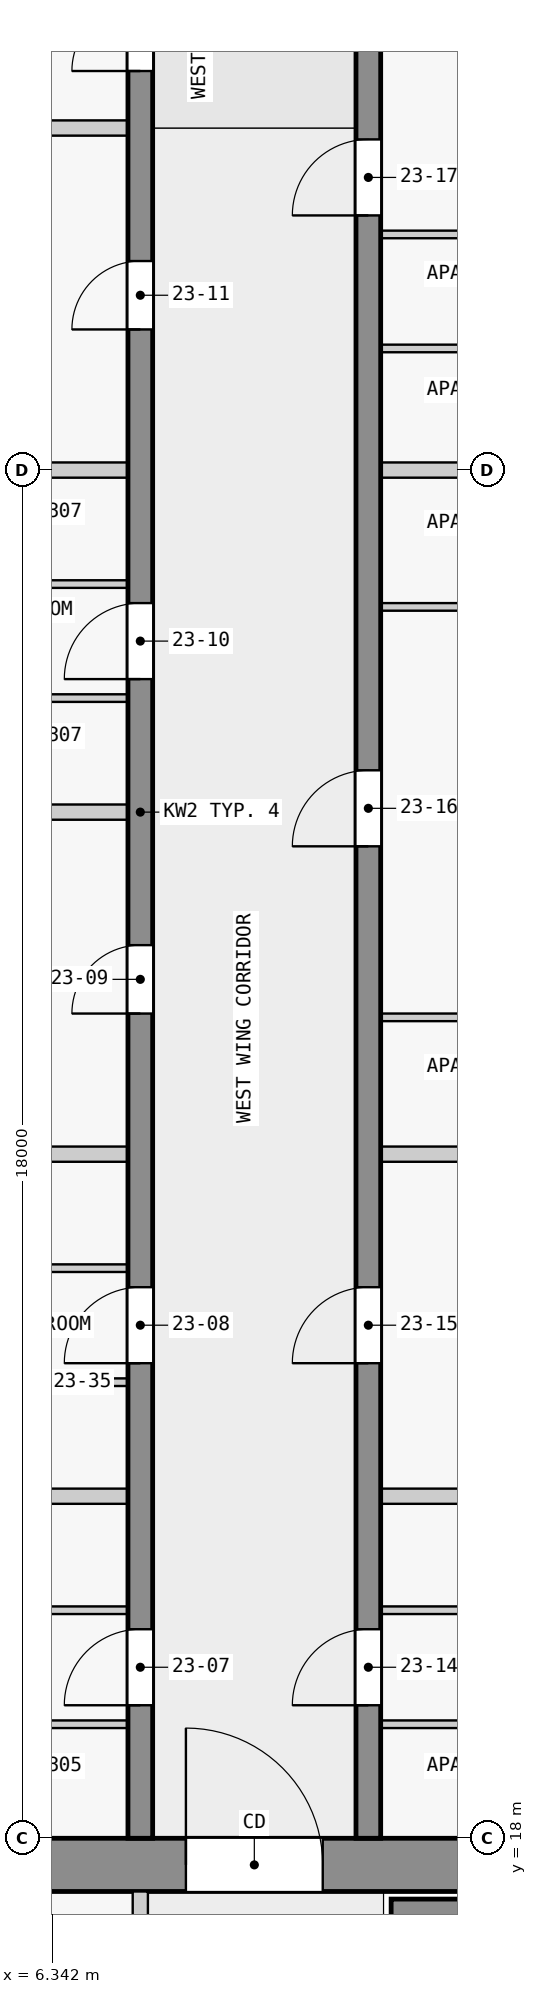
"""IFC4 building model, lengths in metres.
Left out: names, types, materials, properties, quantities, classifications, styles, units other than length and angle.
Written with IfcOpenShell. Run it as: python <this file> out.ifc"""

import sys

from ifc_helpers import new_model, si_unit, direction, frame, frame_2d, origin, place, context, subcontext, project, spatial, rectangle, extrude, element, fill, save


model = new_model("IFC4")
c1 = context("Model", 3, precision=1e-05, world=origin(), true_north=direction((0.0, 1.0)))
c2 = subcontext(c1, "Body", "Model", "MODEL_VIEW")
j1 = project(units=[si_unit("LENGTHUNIT", "METRE"), si_unit("PLANEANGLEUNIT", "RADIAN")], contexts=[c1])
p1 = place(None, origin())
s1 = spatial("IfcSite", under=j1, at=p1, CompositionType="ELEMENT")
p2 = place(p1, origin())
s2 = spatial("IfcBuilding", under=s1, at=p2, CompositionType="ELEMENT")
p3 = place(p2, frame((0.0, 0.0, 92.3)))
s3 = spatial("IfcBuildingStorey", under=s2, at=p3, CompositionType="ELEMENT", Elevation=92.3)
p4 = place(p3, frame((1.6, 17.65, 0.0), z_axis=(0.0, 0.0, 1.0), x_axis=(1.0, 0.0, 0.0)))
e1 = element("IfcWall", 1, at=p4, inside=s3, PredefinedType="SHEAR", context=c2, shape_type="SweptSolid", body=[
    extrude(rectangle(XDim=20.9, YDim=0.7, at=frame_2d((10.45, 0.0))), origin(), (0.0, 0.0, 1.0), 3.25),
])
p5 = place(p4, frame((6.5, 0.0, 0.0)))
e2 = element("IfcOpeningElement", 2, at=p5, cuts=e1, PredefinedType="OPENING", context=c2, shape_type="SweptSolid", body=[
    extrude(rectangle(XDim=1.8, YDim=2.1, at=frame_2d((0.9, 1.05))), frame((0.0, 0.36, 0.0), z_axis=(0.0, -1.0, 0.0), x_axis=(1.0, 0.0, 0.0)), (0.0, 0.0, 1.0), 0.72),
])
p6 = place(p3, frame((10.8, 17.05, 0.0), z_axis=(0.0, 0.0, 1.0), x_axis=(1.0, 0.0, 0.0)))
e3 = element("IfcWall", 3, at=p6, inside=s3, PredefinedType="SHEAR", context=c2, shape_type="SweptSolid", body=[
    extrude(rectangle(XDim=7.8, YDim=0.3, at=frame_2d((3.9, 0.0))), origin(), (0.0, 0.0, 1.0), 3.25),
])
p7 = place(p3, frame((7.5, 18.0, 0.0), z_axis=(0.0, 0.0, 1.0), x_axis=(0.0, 1.0, 0.0)))
e4 = element("IfcWall", 4, at=p7, inside=s3, PredefinedType="SHEAR", context=c2, shape_type="SweptSolid", body=[
    extrude(rectangle(XDim=27.0, YDim=0.325, at=frame_2d((13.5, 0.0))), origin(), (0.0, 0.0, 1.0), 3.25),
])
p8 = place(p7, frame((1.75, 0.0, 0.0)))
e5 = element("IfcOpeningElement", 5, at=p8, cuts=e4, PredefinedType="OPENING", context=c2, shape_type="SweptSolid", body=[
    extrude(rectangle(XDim=1.0, YDim=2.1, at=frame_2d((0.5, 1.05))), frame((0.0, 0.172, 0.0), z_axis=(0.0, -1.0, 0.0), x_axis=(1.0, 0.0, 0.0)), (0.0, 0.0, 1.0), 0.345),
])
p9 = place(p7, frame((6.25, 0.0, 0.0)))
e6 = element("IfcOpeningElement", 6, at=p9, cuts=e4, PredefinedType="OPENING", context=c2, shape_type="SweptSolid", body=[
    extrude(rectangle(XDim=1.0, YDim=2.1, at=frame_2d((0.5, 1.05))), frame((0.0, 0.172, 0.0), z_axis=(0.0, -1.0, 0.0), x_axis=(1.0, 0.0, 0.0)), (0.0, 0.0, 1.0), 0.345),
])
p10 = place(p7, frame((10.85, 0.0, 0.0)))
e7 = element("IfcOpeningElement", 7, at=p10, cuts=e4, PredefinedType="OPENING", context=c2, shape_type="SweptSolid", body=[
    extrude(rectangle(XDim=0.9, YDim=2.1, at=frame_2d((0.45, 1.05))), frame((0.0, 0.172, 0.0), z_axis=(0.0, -1.0, 0.0), x_axis=(1.0, 0.0, 0.0)), (0.0, 0.0, 1.0), 0.345),
])
p11 = place(p7, frame((15.25, 0.0, 0.0)))
e8 = element("IfcOpeningElement", 8, at=p11, cuts=e4, PredefinedType="OPENING", context=c2, shape_type="SweptSolid", body=[
    extrude(rectangle(XDim=1.0, YDim=2.1, at=frame_2d((0.5, 1.05))), frame((0.0, 0.172, 0.0), z_axis=(0.0, -1.0, 0.0), x_axis=(1.0, 0.0, 0.0)), (0.0, 0.0, 1.0), 0.345),
])
p12 = place(p7, frame((19.85, 0.0, 0.0)))
e9 = element("IfcOpeningElement", 9, at=p12, cuts=e4, PredefinedType="OPENING", context=c2, shape_type="SweptSolid", body=[
    extrude(rectangle(XDim=0.9, YDim=2.1, at=frame_2d((0.45, 1.05))), frame((0.0, 0.172, 0.0), z_axis=(0.0, -1.0, 0.0), x_axis=(1.0, 0.0, 0.0)), (0.0, 0.0, 1.0), 0.345),
])
p13 = place(p7, frame((23.25, 0.0, 0.0)))
e10 = element("IfcOpeningElement", 10, at=p13, cuts=e4, PredefinedType="OPENING", context=c2, shape_type="SweptSolid", body=[
    extrude(rectangle(XDim=0.9, YDim=2.1, at=frame_2d((0.45, 1.05))), frame((0.0, 0.172, 0.0), z_axis=(0.0, -1.0, 0.0), x_axis=(1.0, 0.0, 0.0)), (0.0, 0.0, 1.0), 0.345),
])
p14 = place(p7, frame((25.45, 0.0, 0.0)))
e11 = element("IfcOpeningElement", 11, at=p14, cuts=e4, PredefinedType="OPENING", context=c2, shape_type="SweptSolid", body=[
    extrude(rectangle(XDim=1.0, YDim=2.1, at=frame_2d((0.5, 1.05))), frame((0.0, 0.172, 0.0), z_axis=(0.0, -1.0, 0.0), x_axis=(1.0, 0.0, 0.0)), (0.0, 0.0, 1.0), 0.345),
])
p15 = place(p3, frame((10.5, 18.0, 0.0), z_axis=(0.0, 0.0, 1.0), x_axis=(0.0, 1.0, 0.0)))
e12 = element("IfcWall", 12, at=p15, inside=s3, PredefinedType="SHEAR", context=c2, shape_type="SweptSolid", body=[
    extrude(rectangle(XDim=27.0, YDim=0.325, at=frame_2d((13.5, 0.0))), origin(), (0.0, 0.0, 1.0), 3.25),
])
p16 = place(p15, frame((1.75, 0.0, 0.0)))
e13 = element("IfcOpeningElement", 13, at=p16, cuts=e12, PredefinedType="OPENING", context=c2, shape_type="SweptSolid", body=[
    extrude(rectangle(XDim=1.0, YDim=2.1, at=frame_2d((0.5, 1.05))), frame((0.0, 0.172, 0.0), z_axis=(0.0, -1.0, 0.0), x_axis=(1.0, 0.0, 0.0)), (0.0, 0.0, 1.0), 0.345),
])
p17 = place(p15, frame((6.25, 0.0, 0.0)))
e14 = element("IfcOpeningElement", 14, at=p17, cuts=e12, PredefinedType="OPENING", context=c2, shape_type="SweptSolid", body=[
    extrude(rectangle(XDim=1.0, YDim=2.1, at=frame_2d((0.5, 1.05))), frame((0.0, 0.172, 0.0), z_axis=(0.0, -1.0, 0.0), x_axis=(1.0, 0.0, 0.0)), (0.0, 0.0, 1.0), 0.345),
])
p18 = place(p15, frame((13.05, 0.0, 0.0)))
e15 = element("IfcOpeningElement", 15, at=p18, cuts=e12, PredefinedType="OPENING", context=c2, shape_type="SweptSolid", body=[
    extrude(rectangle(XDim=1.0, YDim=2.1, at=frame_2d((0.5, 1.05))), frame((0.0, 0.172, 0.0), z_axis=(0.0, -1.0, 0.0), x_axis=(1.0, 0.0, 0.0)), (0.0, 0.0, 1.0), 0.345),
])
p19 = place(p15, frame((21.35, 0.0, 0.0)))
e16 = element("IfcOpeningElement", 16, at=p19, cuts=e12, PredefinedType="OPENING", context=c2, shape_type="SweptSolid", body=[
    extrude(rectangle(XDim=1.0, YDim=2.1, at=frame_2d((0.5, 1.05))), frame((0.0, 0.172, 0.0), z_axis=(0.0, -1.0, 0.0), x_axis=(1.0, 0.0, 0.0)), (0.0, 0.0, 1.0), 0.345),
])
p20 = place(p3, frame((7.5, 10.1, 0.0), z_axis=(0.0, 0.0, 1.0), x_axis=(0.0, 1.0, 0.0)))
e17 = element("IfcWall", 17, at=p20, inside=s3, PredefinedType="PARTITIONING", context=c2, shape_type="SweptSolid", body=[
    extrude(rectangle(XDim=7.2, YDim=0.2, at=frame_2d((3.6, 0.0))), origin(), (0.0, 0.0, 1.0), 3.25),
])
p21 = place(p20, frame((1.05, 0.0, 0.0)))
e18 = element("IfcOpeningElement", 18, at=p21, cuts=e17, PredefinedType="OPENING", context=c2, shape_type="SweptSolid", body=[
    extrude(rectangle(XDim=0.9, YDim=2.1, at=frame_2d((0.45, 1.05))), frame((0.0, 0.11, 0.0), z_axis=(0.0, -1.0, 0.0), x_axis=(1.0, 0.0, 0.0)), (0.0, 0.0, 1.0), 0.22),
])
p22 = place(p20, frame((4.65, 0.0, 0.0)))
e19 = element("IfcOpeningElement", 19, at=p22, cuts=e17, PredefinedType="OPENING", context=c2, shape_type="SweptSolid", body=[
    extrude(rectangle(XDim=0.9, YDim=2.1, at=frame_2d((0.45, 1.05))), frame((0.0, 0.11, 0.0), z_axis=(0.0, -1.0, 0.0), x_axis=(1.0, 0.0, 0.0)), (0.0, 0.0, 1.0), 0.22),
])
p23 = place(p3, frame((7.337, 19.5, 0.0), z_axis=(0.0, 0.0, 1.0), x_axis=(-1.0, 0.0, 0.0)))
e20 = element("IfcWall", 20, at=p23, inside=s3, PredefinedType="PARTITIONING", context=c2, shape_type="SweptSolid", body=[
    extrude(rectangle(XDim=3.4, YDim=0.1, at=frame_2d((1.7, 0.0))), origin(), (0.0, 0.0, 1.0), 3.25),
])
p24 = place(p23, frame((1.25, 0.0, 0.0)))
e21 = element("IfcOpeningElement", 21, at=p24, cuts=e20, PredefinedType="OPENING", context=c2, shape_type="SweptSolid", body=[
    extrude(rectangle(XDim=0.9, YDim=2.1, at=frame_2d((0.45, 1.05))), frame((0.0, 0.06, 0.0), z_axis=(0.0, -1.0, 0.0), x_axis=(1.0, 0.0, 0.0)), (0.0, 0.0, 1.0), 0.12),
])
p25 = place(p3, frame((14.062, 19.5, 0.0), z_axis=(0.0, 0.0, 1.0), x_axis=(-1.0, 0.0, 0.0)))
e22 = element("IfcWall", 22, at=p25, inside=s3, PredefinedType="PARTITIONING", context=c2, shape_type="SweptSolid", body=[
    extrude(rectangle(XDim=3.4, YDim=0.1, at=frame_2d((1.7, 0.0))), origin(), (0.0, 0.0, 1.0), 3.25),
])
p26 = place(p25, frame((1.25, 0.0, 0.0)))
e23 = element("IfcOpeningElement", 23, at=p26, cuts=e22, PredefinedType="OPENING", context=c2, shape_type="SweptSolid", body=[
    extrude(rectangle(XDim=0.9, YDim=2.1, at=frame_2d((0.45, 1.05))), frame((0.0, 0.06, 0.0), z_axis=(0.0, -1.0, 0.0), x_axis=(1.0, 0.0, 0.0)), (0.0, 0.0, 1.0), 0.12),
])
p27 = place(p3, frame((3.938, 21.0, 0.0), z_axis=(0.0, 0.0, 1.0), x_axis=(1.0, 0.0, 0.0)))
e24 = element("IfcWall", 24, at=p27, inside=s3, PredefinedType="PARTITIONING", context=c2, shape_type="SweptSolid", body=[
    extrude(rectangle(XDim=3.4, YDim=0.1, at=frame_2d((1.7, 0.0))), origin(), (0.0, 0.0, 1.0), 3.25),
])
p28 = place(p27, frame((1.25, 0.0, 0.0)))
e25 = element("IfcOpeningElement", 25, at=p28, cuts=e24, PredefinedType="OPENING", context=c2, shape_type="SweptSolid", body=[
    extrude(rectangle(XDim=0.9, YDim=2.1, at=frame_2d((0.45, 1.05))), frame((0.0, 0.06, 0.0), z_axis=(0.0, -1.0, 0.0), x_axis=(1.0, 0.0, 0.0)), (0.0, 0.0, 1.0), 0.12),
])
p29 = place(p3, frame((10.663, 21.0, 0.0), z_axis=(0.0, 0.0, 1.0), x_axis=(1.0, 0.0, 0.0)))
e26 = element("IfcWall", 26, at=p29, inside=s3, PredefinedType="PARTITIONING", context=c2, shape_type="SweptSolid", body=[
    extrude(rectangle(XDim=3.4, YDim=0.1, at=frame_2d((1.7, 0.0))), origin(), (0.0, 0.0, 1.0), 3.25),
])
p30 = place(p29, frame((1.25, 0.0, 0.0)))
e27 = element("IfcOpeningElement", 27, at=p30, cuts=e26, PredefinedType="OPENING", context=c2, shape_type="SweptSolid", body=[
    extrude(rectangle(XDim=0.9, YDim=2.1, at=frame_2d((0.45, 1.05))), frame((0.0, 0.06, 0.0), z_axis=(0.0, -1.0, 0.0), x_axis=(1.0, 0.0, 0.0)), (0.0, 0.0, 1.0), 0.12),
])
for number, where, z_axis, x_axis in (
    (28, (7.337, 22.5, 0.0), (0.0, 0.0, 1.0), (-1.0, 0.0, 0.0)),
    (29, (13.962, 22.5, 0.0), (0.0, 0.0, 1.0), (-1.0, 0.0, 0.0)),
):
    element("IfcWall", number, at=place(p3, frame(where, z_axis=z_axis, x_axis=x_axis)), inside=s3, PredefinedType="PARTITIONING", context=c2, shape_type="SweptSolid", body=[
        extrude(rectangle(XDim=3.3, YDim=0.2, at=frame_2d((1.65, 0.0))), origin(), (0.0, 0.0, 1.0), 3.25),
    ])
p31 = place(p3, frame((7.337, 24.0, 0.0), z_axis=(0.0, 0.0, 1.0), x_axis=(-1.0, 0.0, 0.0)))
e30 = element("IfcWall", 30, at=p31, inside=s3, PredefinedType="PARTITIONING", context=c2, shape_type="SweptSolid", body=[
    extrude(rectangle(XDim=3.4, YDim=0.1, at=frame_2d((1.7, 0.0))), origin(), (0.0, 0.0, 1.0), 3.25),
])
p32 = place(p31, frame((1.25, 0.0, 0.0)))
e31 = element("IfcOpeningElement", 31, at=p32, cuts=e30, PredefinedType="OPENING", context=c2, shape_type="SweptSolid", body=[
    extrude(rectangle(XDim=0.9, YDim=2.1, at=frame_2d((0.45, 1.05))), frame((0.0, 0.06, 0.0), z_axis=(0.0, -1.0, 0.0), x_axis=(1.0, 0.0, 0.0)), (0.0, 0.0, 1.0), 0.12),
])
p33 = place(p3, frame((3.938, 25.5, 0.0), z_axis=(0.0, 0.0, 1.0), x_axis=(1.0, 0.0, 0.0)))
e32 = element("IfcWall", 32, at=p33, inside=s3, PredefinedType="PARTITIONING", context=c2, shape_type="SweptSolid", body=[
    extrude(rectangle(XDim=3.4, YDim=0.1, at=frame_2d((1.7, 0.0))), origin(), (0.0, 0.0, 1.0), 3.25),
])
p34 = place(p33, frame((1.25, 0.0, 0.0)))
e33 = element("IfcOpeningElement", 33, at=p34, cuts=e32, PredefinedType="OPENING", context=c2, shape_type="SweptSolid", body=[
    extrude(rectangle(XDim=0.9, YDim=2.1, at=frame_2d((0.45, 1.05))), frame((0.0, 0.06, 0.0), z_axis=(0.0, -1.0, 0.0), x_axis=(1.0, 0.0, 0.0)), (0.0, 0.0, 1.0), 0.12),
])
p35 = place(p3, frame((7.337, 27.0, 0.0), z_axis=(0.0, 0.0, 1.0), x_axis=(-1.0, 0.0, 0.0)))
e34 = element("IfcWall", 34, at=p35, inside=s3, PredefinedType="PARTITIONING", context=c2, shape_type="SweptSolid", body=[
    extrude(rectangle(XDim=3.3, YDim=0.2, at=frame_2d((1.65, 0.0))), origin(), (0.0, 0.0, 1.0), 3.25),
])
p36 = place(p3, frame((18.08, 27.0, 0.0), z_axis=(0.0, 0.0, 1.0), x_axis=(-1.0, 0.0, 0.0)))
e35 = element("IfcWall", 35, at=p36, inside=s3, PredefinedType="PARTITIONING", context=c2, shape_type="SweptSolid", body=[
    extrude(rectangle(XDim=7.417, YDim=0.2, at=frame_2d((3.709, 0.0))), origin(), (0.0, 0.0, 1.0), 3.25),
])
p37 = place(p3, frame((14.062, 28.8, 0.0), z_axis=(0.0, 0.0, 1.0), x_axis=(-1.0, 0.0, 0.0)))
e36 = element("IfcWall", 36, at=p37, inside=s3, PredefinedType="PARTITIONING", context=c2, shape_type="SweptSolid", body=[
    extrude(rectangle(XDim=3.4, YDim=0.1, at=frame_2d((1.7, 0.0))), origin(), (0.0, 0.0, 1.0), 3.25),
])
p38 = place(p37, frame((1.25, 0.0, 0.0)))
e37 = element("IfcOpeningElement", 37, at=p38, cuts=e36, PredefinedType="OPENING", context=c2, shape_type="SweptSolid", body=[
    extrude(rectangle(XDim=0.9, YDim=2.1, at=frame_2d((0.45, 1.05))), frame((0.0, 0.06, 0.0), z_axis=(0.0, -1.0, 0.0), x_axis=(1.0, 0.0, 0.0)), (0.0, 0.0, 1.0), 0.12),
])
p39 = place(p3, frame((7.337, 31.5, 0.0), z_axis=(0.0, 0.0, 1.0), x_axis=(-1.0, 0.0, 0.0)))
e38 = element("IfcWall", 38, at=p39, inside=s3, PredefinedType="PARTITIONING", context=c2, shape_type="SweptSolid", body=[
    extrude(rectangle(XDim=7.188, YDim=0.2, at=frame_2d((3.594, 0.0))), origin(), (0.0, 0.0, 1.0), 3.25),
])
p40 = place(p3, frame((7.337, 33.0, 0.0), z_axis=(0.0, 0.0, 1.0), x_axis=(-1.0, 0.0, 0.0)))
e39 = element("IfcWall", 39, at=p40, inside=s3, PredefinedType="PARTITIONING", context=c2, shape_type="SweptSolid", body=[
    extrude(rectangle(XDim=3.4, YDim=0.1, at=frame_2d((1.7, 0.0))), origin(), (0.0, 0.0, 1.0), 3.25),
])
p41 = place(p40, frame((1.25, 0.0, 0.0)))
e40 = element("IfcOpeningElement", 40, at=p41, cuts=e39, PredefinedType="OPENING", context=c2, shape_type="SweptSolid", body=[
    extrude(rectangle(XDim=0.9, YDim=2.1, at=frame_2d((0.45, 1.05))), frame((0.0, 0.06, 0.0), z_axis=(0.0, -1.0, 0.0), x_axis=(1.0, 0.0, 0.0)), (0.0, 0.0, 1.0), 0.12),
])
p42 = place(p3, frame((10.663, 34.2, 0.0), z_axis=(0.0, 0.0, 1.0), x_axis=(1.0, 0.0, 0.0)))
e41 = element("IfcWall", 41, at=p42, inside=s3, PredefinedType="PARTITIONING", context=c2, shape_type="SweptSolid", body=[
    extrude(rectangle(XDim=3.35, YDim=0.1, at=frame_2d((1.675, 0.0))), origin(), (0.0, 0.0, 1.0), 3.25),
])
p43 = place(p42, frame((1.25, 0.0, 0.0)))
e42 = element("IfcOpeningElement", 42, at=p43, cuts=e41, PredefinedType="OPENING", context=c2, shape_type="SweptSolid", body=[
    extrude(rectangle(XDim=0.9, YDim=2.1, at=frame_2d((0.45, 1.05))), frame((0.0, 0.06, 0.0), z_axis=(0.0, -1.0, 0.0), x_axis=(1.0, 0.0, 0.0)), (0.0, 0.0, 1.0), 0.12),
])
p44 = place(p3, frame((3.938, 34.5, 0.0), z_axis=(0.0, 0.0, 1.0), x_axis=(1.0, 0.0, 0.0)))
e43 = element("IfcWall", 43, at=p44, inside=s3, PredefinedType="PARTITIONING", context=c2, shape_type="SweptSolid", body=[
    extrude(rectangle(XDim=3.4, YDim=0.1, at=frame_2d((1.7, 0.0))), origin(), (0.0, 0.0, 1.0), 3.25),
])
p45 = place(p44, frame((1.25, 0.0, 0.0)))
e44 = element("IfcOpeningElement", 44, at=p45, cuts=e43, PredefinedType="OPENING", context=c2, shape_type="SweptSolid", body=[
    extrude(rectangle(XDim=0.9, YDim=2.1, at=frame_2d((0.45, 1.05))), frame((0.0, 0.06, 0.0), z_axis=(0.0, -1.0, 0.0), x_axis=(1.0, 0.0, 0.0)), (0.0, 0.0, 1.0), 0.12),
])
for number, where, z_axis, x_axis in (
    (45, (7.337, 36.0, 0.0), (0.0, 0.0, 1.0), (-1.0, 0.0, 0.0)),
    (46, (14.062, 36.0, 0.0), (0.0, 0.0, 1.0), (-1.0, 0.0, 0.0)),
):
    element("IfcWall", number, at=place(p3, frame(where, z_axis=z_axis, x_axis=x_axis)), inside=s3, PredefinedType="PARTITIONING", context=c2, shape_type="SweptSolid", body=[
        extrude(rectangle(XDim=3.4, YDim=0.2, at=frame_2d((1.7, 0.0))), origin(), (0.0, 0.0, 1.0), 3.25),
    ])
p46 = place(p3, frame((14.012, 37.6, 0.0), z_axis=(0.0, 0.0, 1.0), x_axis=(-1.0, 0.0, 0.0)))
e47 = element("IfcWall", 47, at=p46, inside=s3, PredefinedType="PARTITIONING", context=c2, shape_type="SweptSolid", body=[
    extrude(rectangle(XDim=3.35, YDim=0.1, at=frame_2d((1.675, 0.0))), origin(), (0.0, 0.0, 1.0), 3.25),
])
p47 = place(p3, frame((14.012, 39.1, 0.0), z_axis=(0.0, 0.0, 1.0), x_axis=(-1.0, 0.0, 0.0)))
e48 = element("IfcWall", 48, at=p47, inside=s3, PredefinedType="PARTITIONING", context=c2, shape_type="SweptSolid", body=[
    extrude(rectangle(XDim=3.35, YDim=0.1, at=frame_2d((1.675, 0.0))), origin(), (0.0, 0.0, 1.0), 3.25),
])
p48 = place(p47, frame((1.25, 0.0, 0.0)))
e49 = element("IfcOpeningElement", 49, at=p48, cuts=e48, PredefinedType="OPENING", context=c2, shape_type="SweptSolid", body=[
    extrude(rectangle(XDim=0.9, YDim=2.1, at=frame_2d((0.45, 1.05))), frame((0.0, 0.06, 0.0), z_axis=(0.0, -1.0, 0.0), x_axis=(1.0, 0.0, 0.0)), (0.0, 0.0, 1.0), 0.12),
])
p49 = place(p3, frame((7.337, 40.5, 0.0), z_axis=(0.0, 0.0, 1.0), x_axis=(-1.0, 0.0, 0.0)))
e50 = element("IfcWall", 50, at=p49, inside=s3, PredefinedType="PARTITIONING", context=c2, shape_type="SweptSolid", body=[
    extrude(rectangle(XDim=7.417, YDim=0.2, at=frame_2d((3.709, 0.0))), origin(), (0.0, 0.0, 1.0), 3.25),
])
p50 = place(p5, origin())
e51 = element("IfcDoor", 51, at=p50, inside=s3, OperationType="DOUBLE_DOOR_SINGLE_SWING", PredefinedType="DOOR", context=c2, shape_type="SweptSolid", body=[
    extrude(rectangle(XDim=1.8, YDim=2.1, at=frame_2d((0.9, 1.05))), frame((0.0, 0.025, 0.0), z_axis=(0.0, -1.0, 0.0), x_axis=(1.0, 0.0, 0.0)), (0.0, 0.0, 1.0), 0.05),
])
fill(e2, e51)
p51 = place(p8, origin())
e52 = element("IfcDoor", 52, at=p51, inside=s3, OperationType="SINGLE_SWING_LEFT", PredefinedType="DOOR", context=c2, shape_type="SweptSolid", body=[
    extrude(rectangle(XDim=1.0, YDim=2.1, at=frame_2d((0.5, 1.05))), frame((0.0, 0.025, 0.0), z_axis=(0.0, -1.0, 0.0), x_axis=(1.0, 0.0, 0.0)), (0.0, 0.0, 1.0), 0.05),
])
fill(e5, e52)
p52 = place(p9, origin())
e53 = element("IfcDoor", 53, at=p52, inside=s3, OperationType="SINGLE_SWING_LEFT", PredefinedType="DOOR", context=c2, shape_type="SweptSolid", body=[
    extrude(rectangle(XDim=1.0, YDim=2.1, at=frame_2d((0.5, 1.05))), frame((0.0, 0.025, 0.0), z_axis=(0.0, -1.0, 0.0), x_axis=(1.0, 0.0, 0.0)), (0.0, 0.0, 1.0), 0.05),
])
fill(e6, e53)
p53 = place(p10, origin())
e54 = element("IfcDoor", 54, at=p53, inside=s3, OperationType="SINGLE_SWING_LEFT", PredefinedType="DOOR", context=c2, shape_type="SweptSolid", body=[
    extrude(rectangle(XDim=0.9, YDim=2.1, at=frame_2d((0.45, 1.05))), frame((0.0, 0.025, 0.0), z_axis=(0.0, -1.0, 0.0), x_axis=(1.0, 0.0, 0.0)), (0.0, 0.0, 1.0), 0.05),
])
fill(e7, e54)
p54 = place(p11, origin())
e55 = element("IfcDoor", 55, at=p54, inside=s3, OperationType="SINGLE_SWING_RIGHT", PredefinedType="DOOR", context=c2, shape_type="SweptSolid", body=[
    extrude(rectangle(XDim=1.0, YDim=2.1, at=frame_2d((0.5, 1.05))), frame((0.0, 0.025, 0.0), z_axis=(0.0, -1.0, 0.0), x_axis=(1.0, 0.0, 0.0)), (0.0, 0.0, 1.0), 0.05),
])
fill(e8, e55)
p55 = place(p12, origin())
e56 = element("IfcDoor", 56, at=p55, inside=s3, OperationType="SINGLE_SWING_RIGHT", PredefinedType="DOOR", context=c2, shape_type="SweptSolid", body=[
    extrude(rectangle(XDim=0.9, YDim=2.1, at=frame_2d((0.45, 1.05))), frame((0.0, 0.025, 0.0), z_axis=(0.0, -1.0, 0.0), x_axis=(1.0, 0.0, 0.0)), (0.0, 0.0, 1.0), 0.05),
])
fill(e9, e56)
p56 = place(p13, origin())
e57 = element("IfcDoor", 57, at=p56, inside=s3, OperationType="SINGLE_SWING_RIGHT", PredefinedType="DOOR", context=c2, shape_type="SweptSolid", body=[
    extrude(rectangle(XDim=0.9, YDim=2.1, at=frame_2d((0.45, 1.05))), frame((0.0, 0.025, 0.0), z_axis=(0.0, -1.0, 0.0), x_axis=(1.0, 0.0, 0.0)), (0.0, 0.0, 1.0), 0.05),
])
fill(e10, e57)
p57 = place(p16, origin())
e58 = element("IfcDoor", 58, at=p57, inside=s3, OperationType="SINGLE_SWING_LEFT", PredefinedType="DOOR", context=c2, shape_type="SweptSolid", body=[
    extrude(rectangle(XDim=1.0, YDim=2.1, at=frame_2d((0.5, 1.05))), frame((0.0, 0.025, 0.0), z_axis=(0.0, -1.0, 0.0), x_axis=(1.0, 0.0, 0.0)), (0.0, 0.0, 1.0), 0.05),
])
fill(e13, e58)
p58 = place(p17, origin())
e59 = element("IfcDoor", 59, at=p58, inside=s3, OperationType="SINGLE_SWING_LEFT", PredefinedType="DOOR", context=c2, shape_type="SweptSolid", body=[
    extrude(rectangle(XDim=1.0, YDim=2.1, at=frame_2d((0.5, 1.05))), frame((0.0, 0.025, 0.0), z_axis=(0.0, -1.0, 0.0), x_axis=(1.0, 0.0, 0.0)), (0.0, 0.0, 1.0), 0.05),
])
fill(e14, e59)
p59 = place(p18, origin())
e60 = element("IfcDoor", 60, at=p59, inside=s3, OperationType="SINGLE_SWING_RIGHT", PredefinedType="DOOR", context=c2, shape_type="SweptSolid", body=[
    extrude(rectangle(XDim=1.0, YDim=2.1, at=frame_2d((0.5, 1.05))), frame((0.0, 0.025, 0.0), z_axis=(0.0, -1.0, 0.0), x_axis=(1.0, 0.0, 0.0)), (0.0, 0.0, 1.0), 0.05),
])
fill(e15, e60)
p60 = place(p19, origin())
e61 = element("IfcDoor", 61, at=p60, inside=s3, OperationType="SINGLE_SWING_RIGHT", PredefinedType="DOOR", context=c2, shape_type="SweptSolid", body=[
    extrude(rectangle(XDim=1.0, YDim=2.1, at=frame_2d((0.5, 1.05))), frame((0.0, 0.025, 0.0), z_axis=(0.0, -1.0, 0.0), x_axis=(1.0, 0.0, 0.0)), (0.0, 0.0, 1.0), 0.05),
])
fill(e16, e61)
save(model, sys.argv[1])
